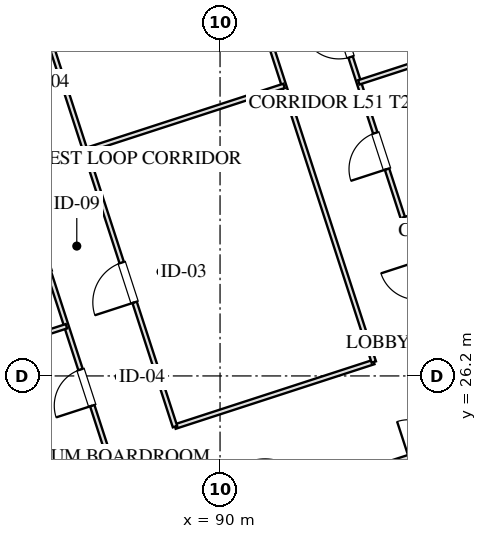
"""IFC4 building model, lengths in metres.
Left out: names, types, materials, properties, quantities, classifications, styles, units other than length and angle.
Written with IfcOpenShell. Run it as: python <this file> out.ifc"""

import sys

from ifc_helpers import new_model, si_unit, direction, frame, frame_2d, origin, place, context, subcontext, project, spatial, rectangle, extrude, element, fill, save


model = new_model("IFC4")
c1 = context("Model", 3, precision=1e-05, world=origin(), true_north=direction((0.0, 1.0)))
c2 = subcontext(c1, "Body", "Model", "MODEL_VIEW")
j1 = project(units=[si_unit("LENGTHUNIT", "METRE"), si_unit("PLANEANGLEUNIT", "RADIAN")], contexts=[c1])
p1 = place(None, origin())
s1 = spatial("IfcSite", under=j1, at=p1, CompositionType="ELEMENT")
p2 = place(p1, origin())
s2 = spatial("IfcBuilding", under=s1, at=p2, CompositionType="ELEMENT")
p3 = place(p2, frame((0.0, 0.0, 192.05)))
s3 = spatial("IfcBuildingStorey", under=s2, at=p3, CompositionType="ELEMENT", Elevation=192.05)
p4 = place(p3, frame((93.542, 23.585, 0.0), z_axis=(0.0, 0.0, 1.0), x_axis=(0.951063829732, 0.308994485023, 0.0)))
e1 = element("IfcWall", 1, at=p4, inside=s3, PredefinedType="PARTITIONING", context=c2, shape_type="SweptSolid", body=[
    extrude(rectangle(XDim=4.4, YDim=0.15, at=frame_2d((2.2, 0.0))), origin(), (0.0, 0.0, 1.0), 3.175),
])
p5 = place(p4, frame((1.5, 0.0, 0.0)))
e2 = element("IfcOpeningElement", 2, at=p5, cuts=e1, PredefinedType="OPENING", context=c2, shape_type="SweptSolid", body=[
    extrude(rectangle(XDim=1.0, YDim=2.05, at=frame_2d((0.5, 1.025))), frame((0.0, 0.085, 0.0), z_axis=(0.0, -1.0, 0.0), x_axis=(1.0, 0.0, 0.0)), (0.0, 0.0, 1.0), 0.17),
])
p6 = place(p3, frame((77.925, 21.328, 0.0), z_axis=(0.0, 0.0, 1.0), x_axis=(0.951053980838, 0.309024797601, 0.0)))
e3 = element("IfcWall", 3, at=p6, inside=s3, PredefinedType="PARTITIONING", context=c2, shape_type="SweptSolid", body=[
    extrude(rectangle(XDim=9.55, YDim=0.12, at=frame_2d((4.775, 0.0))), origin(), (0.0, 0.0, 1.0), 3.175),
])
p7 = place(p3, frame((88.814, 24.867, 0.0), z_axis=(0.0, 0.0, 1.0), x_axis=(0.951061793147, 0.309000753423, 0.0)))
e4 = element("IfcWall", 4, at=p7, inside=s3, PredefinedType="PARTITIONING", context=c2, shape_type="SweptSolid", body=[
    extrude(rectangle(XDim=5.5, YDim=0.12, at=frame_2d((2.75, 0.0))), origin(), (0.0, 0.0, 1.0), 3.175),
])
p8 = place(p3, frame((87.007, 24.28, 0.0), z_axis=(0.0, 0.0, 1.0), x_axis=(-0.309022042254, 0.951054876125, 0.0)))
e5 = element("IfcWall", 5, at=p8, inside=s3, PredefinedType="PARTITIONING", context=c2, shape_type="SweptSolid", body=[
    extrude(rectangle(XDim=16.64, YDim=0.12, at=frame_2d((8.32, 0.0))), origin(), (0.0, 0.0, 1.0), 3.175),
])
p9 = place(p8, frame((1.197, 0.0, 0.0)))
e6 = element("IfcOpeningElement", 6, at=p9, cuts=e5, PredefinedType="OPENING", context=c2, shape_type="SweptSolid", body=[
    extrude(rectangle(XDim=1.0, YDim=2.05, at=frame_2d((0.5, 1.025))), frame((0.0, 0.07, 0.0), z_axis=(0.0, -1.0, 0.0), x_axis=(1.0, 0.0, 0.0)), (0.0, 0.0, 1.0), 0.14),
])
p10 = place(p8, frame((4.891, 0.0, 0.0)))
e7 = element("IfcOpeningElement", 7, at=p10, cuts=e5, PredefinedType="OPENING", context=c2, shape_type="SweptSolid", body=[
    extrude(rectangle(XDim=0.85, YDim=2.05, at=frame_2d((0.425, 1.025))), frame((0.0, 0.07, 0.0), z_axis=(0.0, -1.0, 0.0), x_axis=(1.0, 0.0, 0.0)), (0.0, 0.0, 1.0), 0.14),
])
p11 = place(p8, frame((9.354, 0.0, 0.0)))
e8 = element("IfcOpeningElement", 8, at=p11, cuts=e5, PredefinedType="OPENING", context=c2, shape_type="SweptSolid", body=[
    extrude(rectangle(XDim=1.0, YDim=2.05, at=frame_2d((0.5, 1.025))), frame((0.0, 0.07, 0.0), z_axis=(0.0, -1.0, 0.0), x_axis=(1.0, 0.0, 0.0)), (0.0, 0.0, 1.0), 0.14),
])
p12 = place(p8, frame((13.98, 0.0, 0.0)))
e9 = element("IfcOpeningElement", 9, at=p12, cuts=e5, PredefinedType="OPENING", context=c2, shape_type="SweptSolid", body=[
    extrude(rectangle(XDim=1.0, YDim=2.05, at=frame_2d((0.5, 1.025))), frame((0.0, 0.07, 0.0), z_axis=(0.0, -1.0, 0.0), x_axis=(1.0, 0.0, 0.0)), (0.0, 0.0, 1.0), 0.14),
])
p13 = place(p3, frame((88.814, 24.867, 0.0), z_axis=(0.0, 0.0, 1.0), x_axis=(-0.309022042254, 0.951054876125, 0.0)))
e10 = element("IfcWall", 10, at=p13, inside=s3, PredefinedType="PARTITIONING", context=c2, shape_type="SweptSolid", body=[
    extrude(rectangle(XDim=16.64, YDim=0.12, at=frame_2d((8.32, 0.0))), origin(), (0.0, 0.0, 1.0), 3.175),
])
p14 = place(p13, frame((3.438, 0.0, 0.0)))
e11 = element("IfcOpeningElement", 11, at=p14, cuts=e10, PredefinedType="OPENING", context=c2, shape_type="SweptSolid", body=[
    extrude(rectangle(XDim=1.1, YDim=2.05, at=frame_2d((0.55, 1.025))), frame((0.0, 0.07, 0.0), z_axis=(0.0, -1.0, 0.0), x_axis=(1.0, 0.0, 0.0)), (0.0, 0.0, 1.0), 0.14),
])
p15 = place(p13, frame((11.69, 0.0, 0.0)))
e12 = element("IfcOpeningElement", 12, at=p15, cuts=e10, PredefinedType="OPENING", context=c2, shape_type="SweptSolid", body=[
    extrude(rectangle(XDim=1.1, YDim=2.05, at=frame_2d((0.55, 1.025))), frame((0.0, 0.07, 0.0), z_axis=(0.0, -1.0, 0.0), x_axis=(1.0, 0.0, 0.0)), (0.0, 0.0, 1.0), 0.14),
])
p16 = place(p3, frame((94.045, 26.566, 0.0), z_axis=(0.0, 0.0, 1.0), x_axis=(-0.30901773025, 0.951056277195, 0.0)))
e13 = element("IfcWall", 13, at=p16, inside=s3, PredefinedType="PARTITIONING", context=c2, shape_type="SweptSolid", body=[
    extrude(rectangle(XDim=16.64, YDim=0.12, at=frame_2d((8.32, 0.0))), origin(), (0.0, 0.0, 1.0), 3.175),
])
p17 = place(p3, frame((95.852, 27.153, 0.0), z_axis=(0.0, 0.0, 1.0), x_axis=(-0.309004459387, 0.951060589068, 0.0)))
e14 = element("IfcWall", 14, at=p17, inside=s3, PredefinedType="PARTITIONING", context=c2, shape_type="SweptSolid", body=[
    extrude(rectangle(XDim=16.64, YDim=0.12, at=frame_2d((8.32, 0.0))), origin(), (0.0, 0.0, 1.0), 3.175),
])
p18 = place(p17, frame((1.16, 0.0, 0.0)))
e15 = element("IfcOpeningElement", 15, at=p18, cuts=e14, PredefinedType="OPENING", context=c2, shape_type="SweptSolid", body=[
    extrude(rectangle(XDim=1.0, YDim=2.05, at=frame_2d((0.5, 1.025))), frame((0.0, 0.07, 0.0), z_axis=(0.0, -1.0, 0.0), x_axis=(1.0, 0.0, 0.0)), (0.0, 0.0, 1.0), 0.14),
])
p19 = place(p17, frame((4.72, 0.0, 0.0)))
e16 = element("IfcOpeningElement", 16, at=p19, cuts=e14, PredefinedType="OPENING", context=c2, shape_type="SweptSolid", body=[
    extrude(rectangle(XDim=1.0, YDim=2.05, at=frame_2d((0.5, 1.025))), frame((0.0, 0.07, 0.0), z_axis=(0.0, -1.0, 0.0), x_axis=(1.0, 0.0, 0.0)), (0.0, 0.0, 1.0), 0.14),
])
p20 = place(p17, frame((7.82, 0.0, 0.0)))
e17 = element("IfcOpeningElement", 17, at=p20, cuts=e14, PredefinedType="OPENING", context=c2, shape_type="SweptSolid", body=[
    extrude(rectangle(XDim=1.0, YDim=2.05, at=frame_2d((0.5, 1.025))), frame((0.0, 0.07, 0.0), z_axis=(0.0, -1.0, 0.0), x_axis=(1.0, 0.0, 0.0)), (0.0, 0.0, 1.0), 0.14),
])
p21 = place(p17, frame((10.92, 0.0, 0.0)))
e18 = element("IfcOpeningElement", 18, at=p21, cuts=e14, PredefinedType="OPENING", context=c2, shape_type="SweptSolid", body=[
    extrude(rectangle(XDim=1.0, YDim=2.05, at=frame_2d((0.5, 1.025))), frame((0.0, 0.07, 0.0), z_axis=(0.0, -1.0, 0.0), x_axis=(1.0, 0.0, 0.0)), (0.0, 0.0, 1.0), 0.14),
])
p22 = place(p17, frame((14.48, 0.0, 0.0)))
e19 = element("IfcOpeningElement", 19, at=p22, cuts=e14, PredefinedType="OPENING", context=c2, shape_type="SweptSolid", body=[
    extrude(rectangle(XDim=1.0, YDim=2.05, at=frame_2d((0.5, 1.025))), frame((0.0, 0.07, 0.0), z_axis=(0.0, -1.0, 0.0), x_axis=(1.0, 0.0, 0.0)), (0.0, 0.0, 1.0), 0.14),
])
p23 = place(p3, frame((86.453, 32.133, 0.0), z_axis=(0.0, 0.0, 1.0), x_axis=(0.951052986339, 0.309027858251, 0.0)))
e20 = element("IfcWall", 20, at=p23, inside=s3, PredefinedType="PARTITIONING", context=c2, shape_type="SweptSolid", body=[
    extrude(rectangle(XDim=5.5, YDim=0.12, at=frame_2d((2.75, 0.0))), origin(), (0.0, 0.0, 1.0), 3.175),
])
p24 = place(p3, frame((76.876, 24.557, 0.0), z_axis=(0.0, 0.0, 1.0), x_axis=(0.951056422073, 0.309017284359, 0.0)))
e21 = element("IfcWall", 21, at=p24, inside=s3, PredefinedType="PARTITIONING", context=c2, shape_type="SweptSolid", body=[
    extrude(rectangle(XDim=9.55, YDim=0.12, at=frame_2d((4.775, 0.0))), origin(), (0.0, 0.0, 1.0), 3.175),
])
for number, where, z_axis, x_axis in (
    (22, (94.826, 30.311, 0.0), (0.0, 0.0, 1.0), (0.951, 0.309, 0.0)),
    (23, (93.652, 33.925, 0.0), (0.0, 0.0, 1.0), (0.951, 0.309, 0.0)),
):
    element("IfcWall", number, at=place(p3, frame(where, z_axis=z_axis, x_axis=x_axis)), inside=s3, PredefinedType="PARTITIONING", context=c2, shape_type="SweptSolid", body=[
        extrude(rectangle(XDim=11.95, YDim=0.12, at=frame_2d((5.975, 0.0))), origin(), (0.0, 0.0, 1.0), 3.175),
    ])
p25 = place(p9, origin())
e24 = element("IfcDoor", 24, at=p25, inside=s3, OperationType="SINGLE_SWING_LEFT", PredefinedType="DOOR", context=c2, shape_type="SweptSolid", body=[
    extrude(rectangle(XDim=1.0, YDim=2.05, at=frame_2d((0.5, 1.025))), frame((0.0, 0.025, 0.0), z_axis=(0.0, -1.0, 0.0), x_axis=(1.0, 0.0, 0.0)), (0.0, 0.0, 1.0), 0.05),
])
fill(e6, e24)
p26 = place(p14, origin())
e25 = element("IfcDoor", 25, at=p26, inside=s3, OperationType="SINGLE_SWING_LEFT", PredefinedType="DOOR", context=c2, shape_type="SweptSolid", body=[
    extrude(rectangle(XDim=1.1, YDim=2.05, at=frame_2d((0.55, 1.025))), frame((0.0, 0.025, 0.0), z_axis=(0.0, -1.0, 0.0), x_axis=(1.0, 0.0, 0.0)), (0.0, 0.0, 1.0), 0.05),
])
fill(e11, e25)
p27 = place(p19, origin())
e26 = element("IfcDoor", 26, at=p27, inside=s3, OperationType="SINGLE_SWING_LEFT", PredefinedType="DOOR", context=c2, shape_type="SweptSolid", body=[
    extrude(rectangle(XDim=1.0, YDim=2.05, at=frame_2d((0.5, 1.025))), frame((0.0, 0.025, 0.0), z_axis=(0.0, -1.0, 0.0), x_axis=(1.0, 0.0, 0.0)), (0.0, 0.0, 1.0), 0.05),
])
fill(e16, e26)
p28 = place(p20, origin())
e27 = element("IfcDoor", 27, at=p28, inside=s3, OperationType="SINGLE_SWING_RIGHT", PredefinedType="DOOR", context=c2, shape_type="SweptSolid", body=[
    extrude(rectangle(XDim=1.0, YDim=2.05, at=frame_2d((0.5, 1.025))), frame((0.0, 0.025, 0.0), z_axis=(0.0, -1.0, 0.0), x_axis=(1.0, 0.0, 0.0)), (0.0, 0.0, 1.0), 0.05),
])
fill(e17, e27)
save(model, sys.argv[1])
